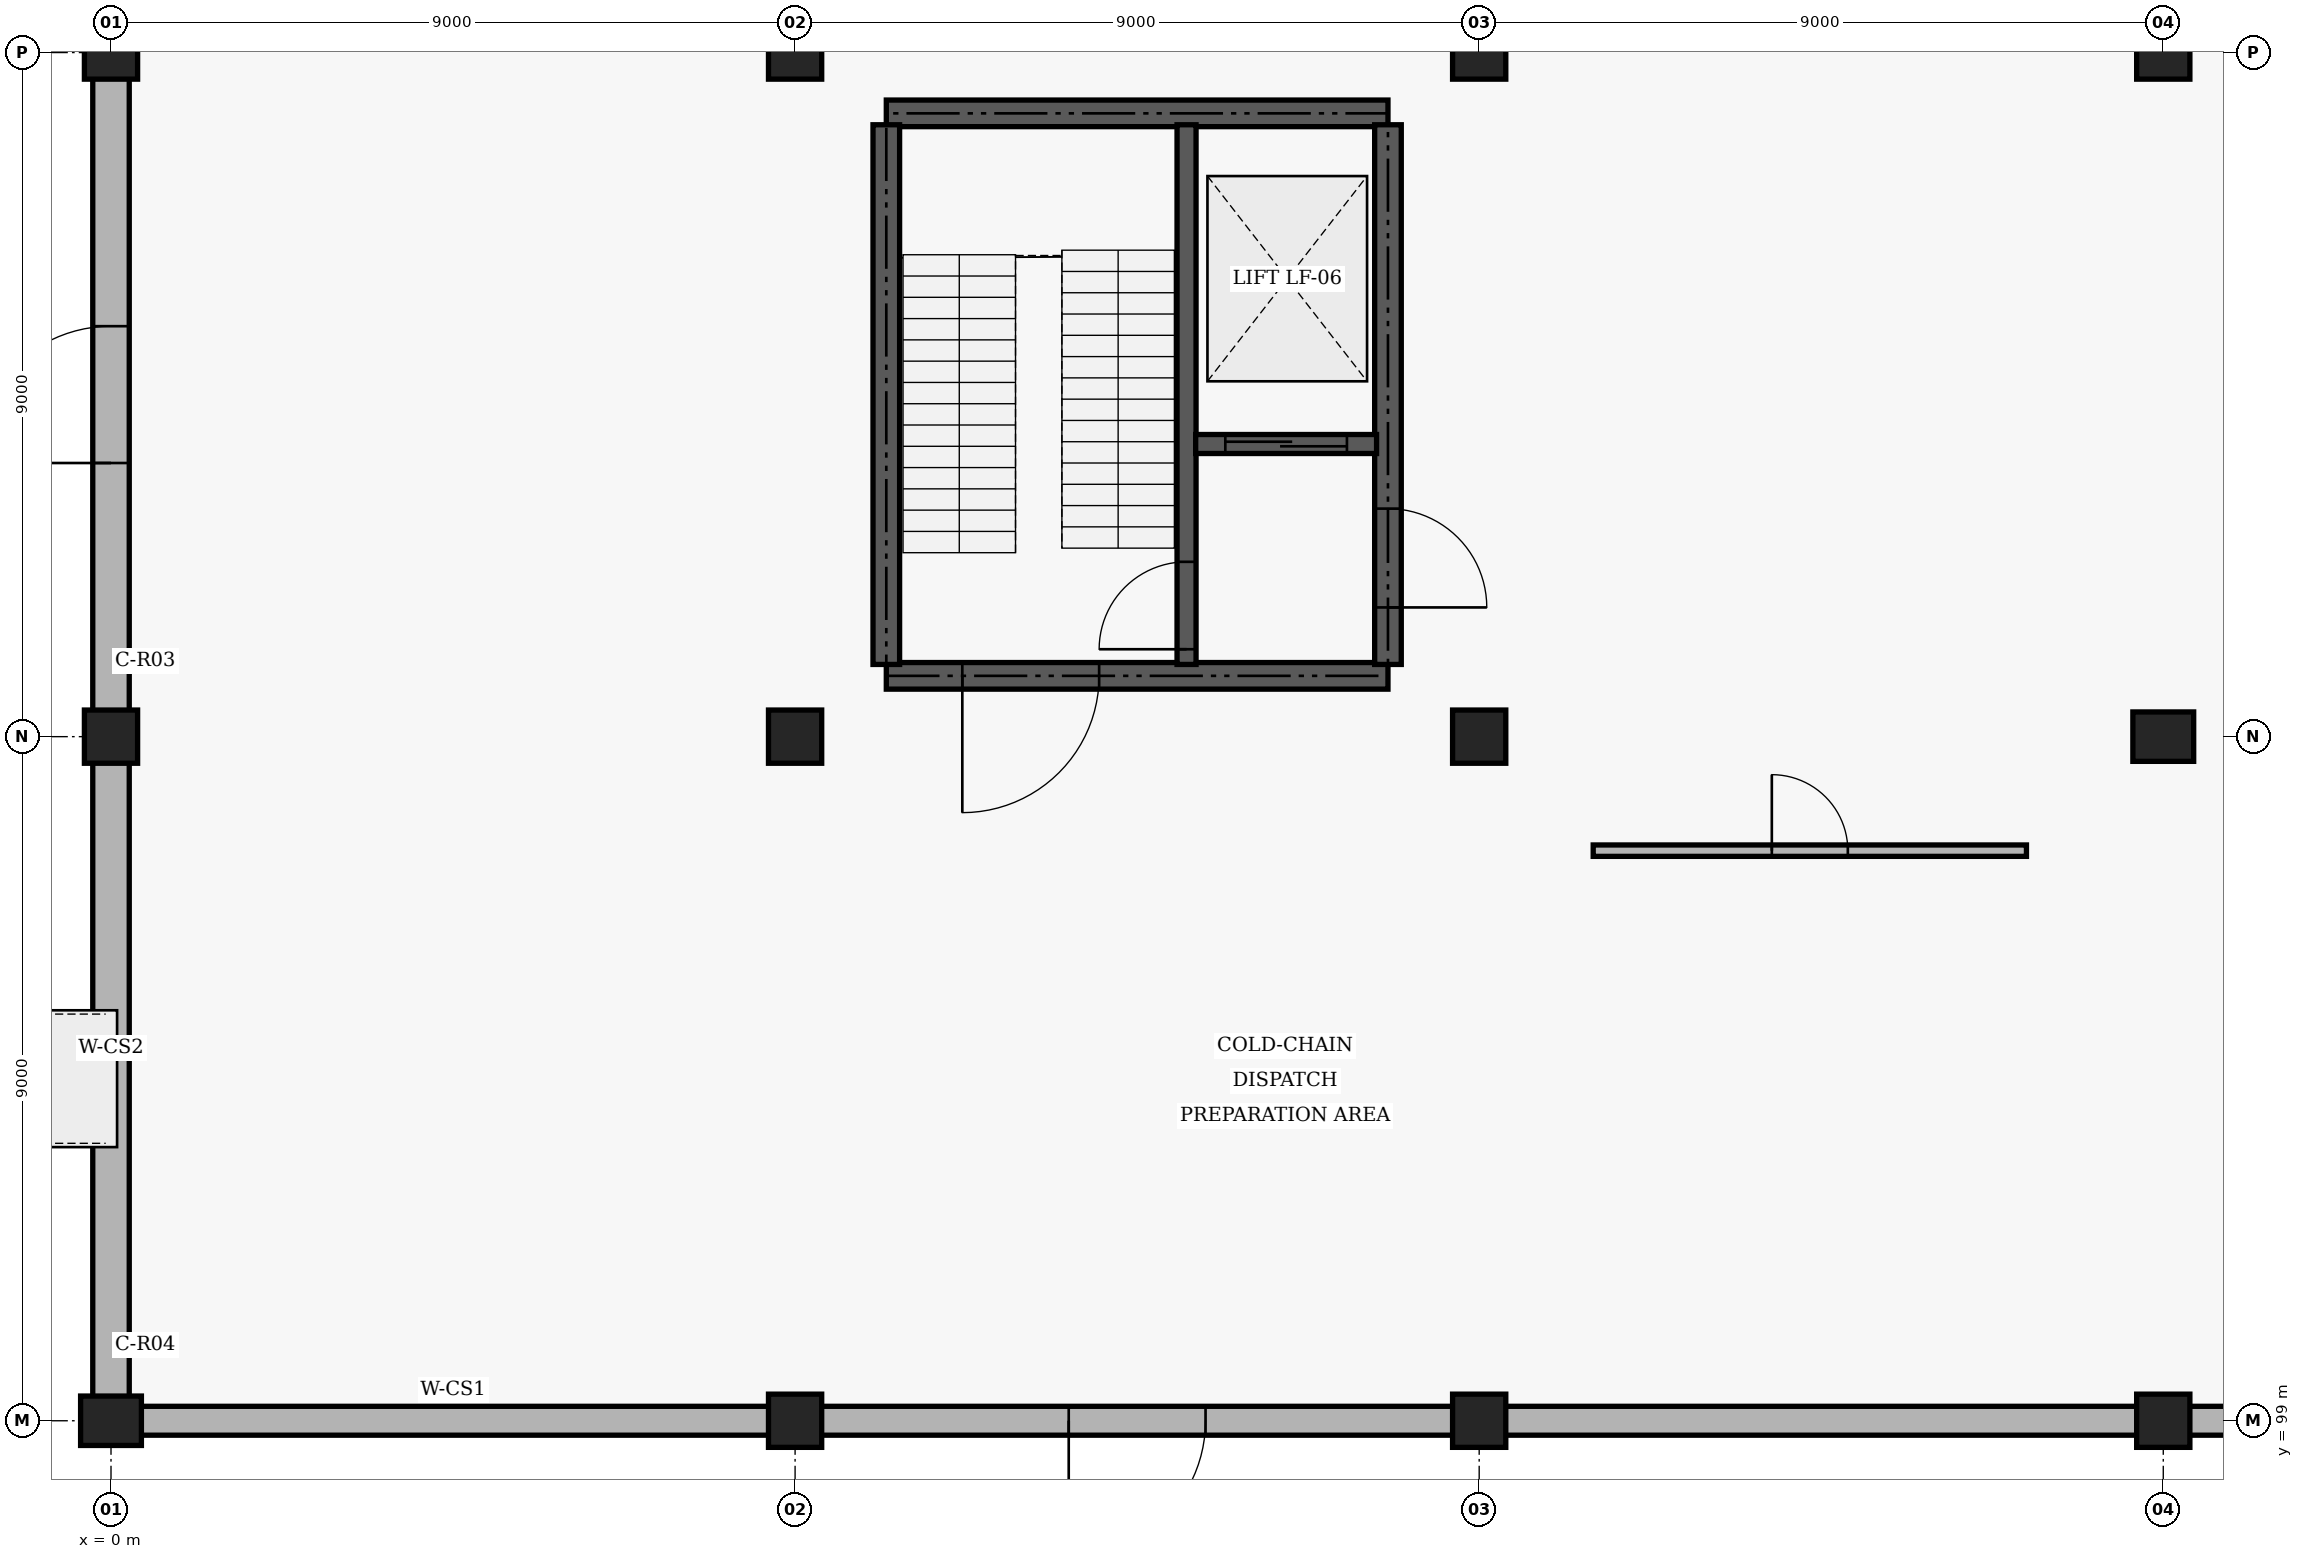
"""IFC4 building model, lengths in metres.
Left out: names, types, materials, properties, quantities, classifications, styles, units other than length and angle.
Written with IfcOpenShell. Run it as: python <this file> out.ifc"""

import sys

from ifc_helpers import new_model, si_unit, direction, frame, frame_2d, origin, origin_2d, place, context, subcontext, project, spatial, rectangle, extrude, element, fill, save


model = new_model("IFC4")
c1 = context("Model", 3, precision=1e-05, world=origin(), true_north=direction((0.0, 1.0)))
c2 = subcontext(c1, "Body", "Model", "MODEL_VIEW")
j1 = project(units=[si_unit("LENGTHUNIT", "METRE"), si_unit("PLANEANGLEUNIT", "RADIAN")], contexts=[c1])
p1 = place(None, origin())
s1 = spatial("IfcSite", under=j1, at=p1, CompositionType="ELEMENT")
p2 = place(p1, origin())
s2 = spatial("IfcBuilding", under=s1, at=p2, CompositionType="ELEMENT")
p3 = place(p2, origin())
s3 = spatial("IfcBuildingStorey", under=s2, at=p3, CompositionType="ELEMENT", Elevation=0.0)
p4 = place(p3, frame((0.0, 99.0, 0.0), z_axis=(0.0, 0.0, 1.0), x_axis=(1.0, 0.0, 0.0)))
e1 = element("IfcColumn", 1, at=p4, inside=s3, PredefinedType="COLUMN", context=c2, shape_type="SweptSolid", body=[
    extrude(rectangle(XDim=0.8, YDim=0.65, at=origin_2d()), origin(), (0.0, 0.0, 1.0), 5.4),
])
for number, where, z_axis, x_axis in (
    (2, (0.0, 108.0, 0.0), (0.0, 0.0, 1.0), (1.0, 0.0, 0.0)),
    (3, (0.0, 117.0, 0.0), (0.0, 0.0, 1.0), (1.0, 0.0, 0.0)),
    (4, (9.0, 99.0, 0.0), (0.0, 0.0, 1.0), (1.0, 0.0, 0.0)),
    (5, (9.0, 108.0, 0.0), (0.0, 0.0, 1.0), (1.0, 0.0, 0.0)),
    (6, (9.0, 117.0, 0.0), (0.0, 0.0, 1.0), (1.0, 0.0, 0.0)),
    (7, (18.0, 99.0, 0.0), (0.0, 0.0, 1.0), (1.0, 0.0, 0.0)),
    (8, (18.0, 108.0, 0.0), (0.0, 0.0, 1.0), (1.0, 0.0, 0.0)),
    (9, (18.0, 117.0, 0.0), (0.0, 0.0, 1.0), (1.0, 0.0, 0.0)),
    (10, (27.0, 99.0, 0.0), (0.0, 0.0, 1.0), (1.0, 0.0, 0.0)),
):
    element("IfcColumn", number, at=place(p3, frame(where, z_axis=z_axis, x_axis=x_axis)), inside=s3, PredefinedType="COLUMN", context=c2, shape_type="SweptSolid", body=[
        extrude(rectangle(XDim=0.7, YDim=0.7, at=origin_2d()), origin(), (0.0, 0.0, 1.0), 5.4),
    ])
p5 = place(p3, frame((27.0, 108.0, 0.0), z_axis=(0.0, 0.0, 1.0), x_axis=(1.0, 0.0, 0.0)))
e11 = element("IfcColumn", 11, at=p5, inside=s3, PredefinedType="COLUMN", context=c2, shape_type="SweptSolid", body=[
    extrude(rectangle(XDim=0.8, YDim=0.65, at=origin_2d()), origin(), (0.0, 0.0, 1.0), 5.4),
])
p6 = place(p3, frame((27.0, 117.0, 0.0), z_axis=(0.0, 0.0, 1.0), x_axis=(1.0, 0.0, 0.0)))
e12 = element("IfcColumn", 12, at=p6, inside=s3, PredefinedType="COLUMN", context=c2, shape_type="SweptSolid", body=[
    extrude(rectangle(XDim=0.7, YDim=0.7, at=origin_2d()), origin(), (0.0, 0.0, 1.0), 5.4),
])
p7 = place(p3, frame((0.0, 99.06, 0.0), z_axis=(0.0, 0.0, 1.0), x_axis=(0.0, 1.0, 0.0)))
e13 = element("IfcWall", 13, at=p7, inside=s3, PredefinedType="SOLIDWALL", context=c2, shape_type="SweptSolid", body=[
    extrude(rectangle(XDim=8.88, YDim=0.48, at=frame_2d((4.44, 0.0))), origin(), (0.0, 0.0, 1.0), 4.55),
])
p8 = place(p3, frame((0.0, 108.06, 0.0), z_axis=(0.0, 0.0, 1.0), x_axis=(0.0, 1.0, 0.0)))
e14 = element("IfcWall", 14, at=p8, inside=s3, PredefinedType="SOLIDWALL", context=c2, shape_type="SweptSolid", body=[
    extrude(rectangle(XDim=8.88, YDim=0.48, at=frame_2d((4.44, 0.0))), origin(), (0.0, 0.0, 1.0), 4.55),
])
p9 = place(p8, frame((3.54, 0.0, 0.0)))
e15 = element("IfcOpeningElement", 15, at=p9, cuts=e14, PredefinedType="OPENING", context=c2, shape_type="SweptSolid", body=[
    extrude(rectangle(XDim=1.8, YDim=2.15, at=frame_2d((0.9, 1.075))), frame((0.0, 0.25, 0.0), z_axis=(0.0, -1.0, 0.0), x_axis=(1.0, 0.0, 0.0)), (0.0, 0.0, 1.0), 0.5),
])
p10 = place(p3, frame((0.06, 99.0, 0.0), z_axis=(0.0, 0.0, 1.0), x_axis=(1.0, 0.0, 0.0)))
e16 = element("IfcWall", 16, at=p10, inside=s3, PredefinedType="SOLIDWALL", context=c2, shape_type="SweptSolid", body=[
    extrude(rectangle(XDim=8.88, YDim=0.38, at=frame_2d((4.44, 0.0))), origin(), (0.0, 0.0, 1.0), 4.55),
])
p11 = place(p3, frame((9.06, 99.0, 0.0), z_axis=(0.0, 0.0, 1.0), x_axis=(1.0, 0.0, 0.0)))
e17 = element("IfcWall", 17, at=p11, inside=s3, PredefinedType="SOLIDWALL", context=c2, shape_type="SweptSolid", body=[
    extrude(rectangle(XDim=8.88, YDim=0.38, at=frame_2d((4.44, 0.0))), origin(), (0.0, 0.0, 1.0), 4.55),
])
p12 = place(p11, frame((3.54, 0.0, 0.0)))
e18 = element("IfcOpeningElement", 18, at=p12, cuts=e17, PredefinedType="OPENING", context=c2, shape_type="SweptSolid", body=[
    extrude(rectangle(XDim=1.8, YDim=2.15, at=frame_2d((0.9, 1.075))), frame((0.0, 0.2, 0.0), z_axis=(0.0, -1.0, 0.0), x_axis=(1.0, 0.0, 0.0)), (0.0, 0.0, 1.0), 0.4),
])
for number, where, z_axis, x_axis in (
    (19, (18.06, 99.0, 0.0), (0.0, 0.0, 1.0), (1.0, 0.0, 0.0)),
    (20, (27.06, 99.0, 0.0), (0.0, 0.0, 1.0), (1.0, 0.0, 0.0)),
):
    element("IfcWall", number, at=place(p3, frame(where, z_axis=z_axis, x_axis=x_axis)), inside=s3, PredefinedType="SOLIDWALL", context=c2, shape_type="SweptSolid", body=[
        extrude(rectangle(XDim=8.88, YDim=0.38, at=frame_2d((4.44, 0.0))), origin(), (0.0, 0.0, 1.0), 4.55),
    ])
p13 = place(p3, frame((10.2, 108.8, 0.0), z_axis=(0.0, 0.0, 1.0), x_axis=(1.0, 0.0, 0.0)))
e21 = element("IfcWall", 21, at=p13, inside=s3, PredefinedType="SHEAR", context=c2, shape_type="SweptSolid", body=[
    extrude(rectangle(XDim=6.6, YDim=0.35, at=frame_2d((3.3, 0.0))), origin(), (0.0, 0.0, 1.0), 5.4),
])
p14 = place(p13, frame((1.0, 0.0, 0.0)))
e22 = element("IfcOpeningElement", 22, at=p14, cuts=e21, PredefinedType="OPENING", context=c2, shape_type="SweptSolid", body=[
    extrude(rectangle(XDim=1.8, YDim=2.15, at=frame_2d((0.9, 1.075))), frame((0.0, 0.185, 0.0), z_axis=(0.0, -1.0, 0.0), x_axis=(1.0, 0.0, 0.0)), (0.0, 0.0, 1.0), 0.37),
])
p15 = place(p3, frame((10.2, 116.2, 0.0), z_axis=(0.0, 0.0, 1.0), x_axis=(1.0, 0.0, 0.0)))
e23 = element("IfcWall", 23, at=p15, inside=s3, PredefinedType="SHEAR", context=c2, shape_type="SweptSolid", body=[
    extrude(rectangle(XDim=6.6, YDim=0.35, at=frame_2d((3.3, 0.0))), origin(), (0.0, 0.0, 1.0), 5.4),
])
p16 = place(p3, frame((10.2, 108.95, 0.0), z_axis=(0.0, 0.0, 1.0), x_axis=(0.0, 1.0, 0.0)))
e24 = element("IfcWall", 24, at=p16, inside=s3, PredefinedType="SHEAR", context=c2, shape_type="SweptSolid", body=[
    extrude(rectangle(XDim=7.1, YDim=0.35, at=frame_2d((3.55, 0.0))), origin(), (0.0, 0.0, 1.0), 5.4),
])
p17 = place(p3, frame((16.8, 108.95, 0.0), z_axis=(0.0, 0.0, 1.0), x_axis=(0.0, 1.0, 0.0)))
e25 = element("IfcWall", 25, at=p17, inside=s3, PredefinedType="SHEAR", context=c2, shape_type="SweptSolid", body=[
    extrude(rectangle(XDim=7.1, YDim=0.35, at=frame_2d((3.55, 0.0))), origin(), (0.0, 0.0, 1.0), 5.4),
])
p18 = place(p17, frame((0.75, 0.0, 0.0)))
e26 = element("IfcOpeningElement", 26, at=p18, cuts=e25, PredefinedType="OPENING", context=c2, shape_type="SweptSolid", body=[
    extrude(rectangle(XDim=1.3, YDim=2.15, at=frame_2d((0.65, 1.075))), frame((0.0, 0.185, 0.0), z_axis=(0.0, -1.0, 0.0), x_axis=(1.0, 0.0, 0.0)), (0.0, 0.0, 1.0), 0.37),
])
p19 = place(p3, frame((14.15, 108.95, 0.0), z_axis=(0.0, 0.0, 1.0), x_axis=(0.0, 1.0, 0.0)))
e27 = element("IfcWall", 27, at=p19, inside=s3, PredefinedType="SHEAR", context=c2, shape_type="SweptSolid", body=[
    extrude(rectangle(XDim=7.1, YDim=0.25, at=frame_2d((3.55, 0.0))), origin(), (0.0, 0.0, 1.0), 5.4),
])
p20 = place(p19, frame((0.2, 0.0, 0.0)))
e28 = element("IfcOpeningElement", 28, at=p20, cuts=e27, PredefinedType="OPENING", context=c2, shape_type="SweptSolid", body=[
    extrude(rectangle(XDim=1.15, YDim=2.15, at=frame_2d((0.575, 1.075))), frame((0.0, 0.135, 0.0), z_axis=(0.0, -1.0, 0.0), x_axis=(1.0, 0.0, 0.0)), (0.0, 0.0, 1.0), 0.27),
])
p21 = place(p3, frame((14.27, 111.85, 0.0), z_axis=(0.0, 0.0, 1.0), x_axis=(1.0, 0.0, 0.0)))
e29 = element("IfcWall", 29, at=p21, inside=s3, PredefinedType="SHEAR", context=c2, shape_type="SweptSolid", body=[
    extrude(rectangle(XDim=2.38, YDim=0.25, at=frame_2d((1.19, 0.0))), origin(), (0.0, 0.0, 1.0), 5.4),
])
p22 = place(p21, frame((0.39, 0.0, 0.0)))
e30 = element("IfcOpeningElement", 30, at=p22, cuts=e29, PredefinedType="OPENING", context=c2, shape_type="SweptSolid", body=[
    extrude(rectangle(XDim=1.6, YDim=2.3, at=frame_2d((0.8, 1.15))), frame((0.0, 0.135, 0.0), z_axis=(0.0, -1.0, 0.0), x_axis=(1.0, 0.0, 0.0)), (0.0, 0.0, 1.0), 0.27),
])
p23 = place(p3, frame((19.5, 106.5, 0.0), z_axis=(0.0, 0.0, 1.0), x_axis=(1.0, 0.0, 0.0)))
e31 = element("IfcWall", 31, at=p23, inside=s3, PredefinedType="PARTITIONING", context=c2, shape_type="SweptSolid", body=[
    extrude(rectangle(XDim=5.7, YDim=0.15, at=frame_2d((2.85, 0.0))), origin(), (0.0, 0.0, 1.0), 4.3),
])
p24 = place(p23, frame((2.35, 0.0, 0.0)))
e32 = element("IfcOpeningElement", 32, at=p24, cuts=e31, PredefinedType="OPENING", context=c2, shape_type="SweptSolid", body=[
    extrude(rectangle(XDim=1.0, YDim=2.1, at=frame_2d((0.5, 1.05))), frame((0.0, 0.085, 0.0), z_axis=(0.0, -1.0, 0.0), x_axis=(1.0, 0.0, 0.0)), (0.0, 0.0, 1.0), 0.17),
])
p25 = place(p9, origin())
e33 = element("IfcDoor", 33, at=p25, inside=s3, OperationType="DOUBLE_DOOR_SINGLE_SWING", PredefinedType="DOOR", context=c2, shape_type="SweptSolid", body=[
    extrude(rectangle(XDim=1.8, YDim=2.15, at=frame_2d((0.9, 1.075))), frame((0.0, 0.025, 0.0), z_axis=(0.0, -1.0, 0.0), x_axis=(1.0, 0.0, 0.0)), (0.0, 0.0, 1.0), 0.05),
])
fill(e15, e33)
p26 = place(p12, frame((1.8, 0.0, 0.0), z_axis=(0.0, 0.0, 1.0), x_axis=(-1.0, 0.0, 0.0)))
e34 = element("IfcDoor", 34, at=p26, inside=s3, OperationType="DOUBLE_DOOR_SINGLE_SWING", PredefinedType="DOOR", context=c2, shape_type="SweptSolid", body=[
    extrude(rectangle(XDim=1.8, YDim=2.15, at=frame_2d((0.9, 1.075))), frame((0.0, 0.025, 0.0), z_axis=(0.0, -1.0, 0.0), x_axis=(1.0, 0.0, 0.0)), (0.0, 0.0, 1.0), 0.05),
])
fill(e18, e34)
p27 = place(p18, frame((1.3, 0.0, 0.0), z_axis=(0.0, 0.0, 1.0), x_axis=(-1.0, 0.0, 0.0)))
e35 = element("IfcDoor", 35, at=p27, inside=s3, OperationType="DOUBLE_DOOR_SINGLE_SWING", PredefinedType="DOOR", context=c2, shape_type="SweptSolid", body=[
    extrude(rectangle(XDim=1.3, YDim=2.15, at=frame_2d((0.65, 1.075))), frame((0.0, 0.025, 0.0), z_axis=(0.0, -1.0, 0.0), x_axis=(1.0, 0.0, 0.0)), (0.0, 0.0, 1.0), 0.05),
])
fill(e26, e35)
p28 = place(p20, origin())
e36 = element("IfcDoor", 36, at=p28, inside=s3, OperationType="SINGLE_SWING_LEFT", PredefinedType="DOOR", context=c2, shape_type="SweptSolid", body=[
    extrude(rectangle(XDim=1.15, YDim=2.15, at=frame_2d((0.575, 1.075))), frame((0.0, 0.025, 0.0), z_axis=(0.0, -1.0, 0.0), x_axis=(1.0, 0.0, 0.0)), (0.0, 0.0, 1.0), 0.05),
])
fill(e28, e36)
p29 = place(p14, frame((1.8, 0.0, 0.0), z_axis=(0.0, 0.0, 1.0), x_axis=(-1.0, 0.0, 0.0)))
e37 = element("IfcDoor", 37, at=p29, inside=s3, OperationType="DOUBLE_DOOR_SINGLE_SWING", PredefinedType="DOOR", context=c2, shape_type="SweptSolid", body=[
    extrude(rectangle(XDim=1.8, YDim=2.15, at=frame_2d((0.9, 1.075))), frame((0.0, 0.025, 0.0), z_axis=(0.0, -1.0, 0.0), x_axis=(1.0, 0.0, 0.0)), (0.0, 0.0, 1.0), 0.05),
])
fill(e22, e37)
p30 = place(p22, origin())
e38 = element("IfcDoor", 38, at=p30, inside=s3, OperationType="SLIDING_TO_LEFT", PredefinedType="DOOR", context=c2, shape_type="SweptSolid", body=[
    extrude(rectangle(XDim=1.6, YDim=2.3, at=frame_2d((0.8, 1.15))), frame((0.0, 0.025, 0.0), z_axis=(0.0, -1.0, 0.0), x_axis=(1.0, 0.0, 0.0)), (0.0, 0.0, 1.0), 0.05),
])
fill(e30, e38)
p31 = place(p24, origin())
e39 = element("IfcDoor", 39, at=p31, inside=s3, OperationType="SINGLE_SWING_LEFT", PredefinedType="DOOR", context=c2, shape_type="SweptSolid", body=[
    extrude(rectangle(XDim=1.0, YDim=2.1, at=frame_2d((0.5, 1.05))), frame((0.0, 0.025, 0.0), z_axis=(0.0, -1.0, 0.0), x_axis=(1.0, 0.0, 0.0)), (0.0, 0.0, 1.0), 0.05),
])
fill(e32, e39)
save(model, sys.argv[1])
